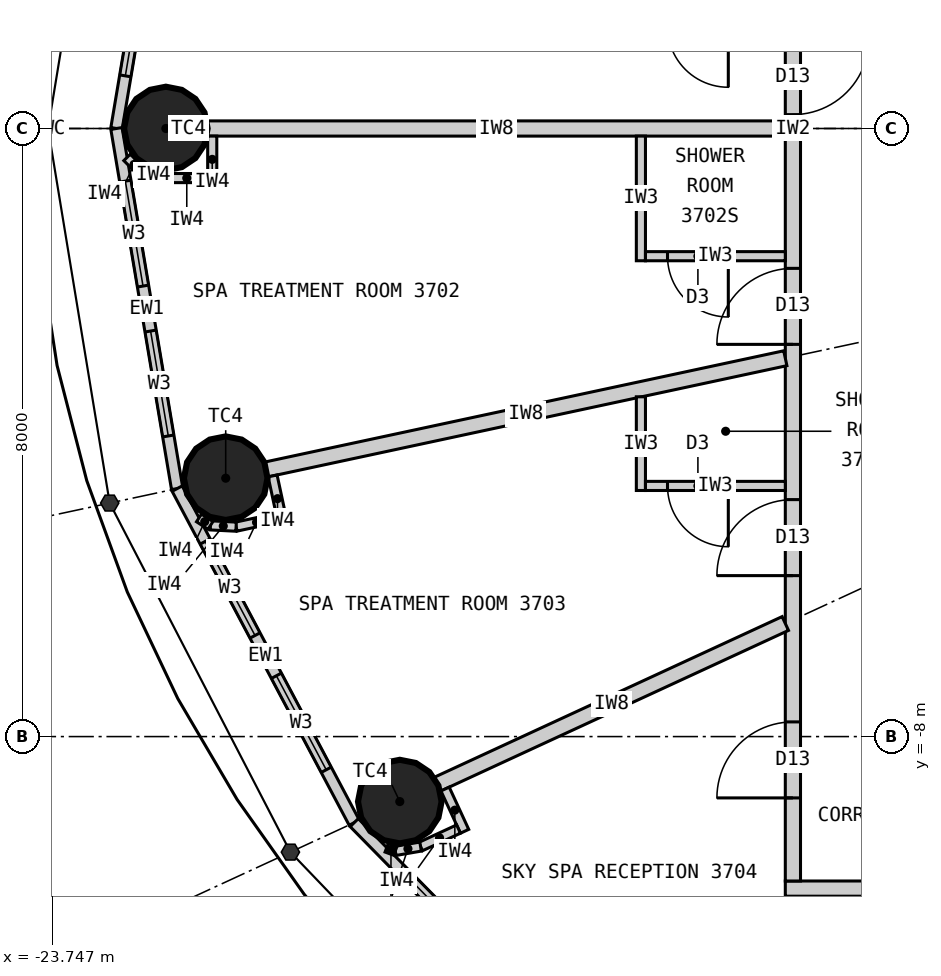
"""IFC4 building model, lengths in metres.
Left out: names, types, materials, properties, quantities, classifications, styles, units other than length and angle.
Written with IfcOpenShell. Run it as: python <this file> out.ifc"""

import sys

from ifc_helpers import new_model, si_unit, direction, frame, frame_2d, origin, origin_2d, place, context, subcontext, project, spatial, rectangle, circle, extrude, element, fill, save


model = new_model("IFC4")
c1 = context("Model", 3, precision=1e-05, world=origin(), true_north=direction((0.0, 1.0)))
c2 = subcontext(c1, "Body", "Model", "MODEL_VIEW")
j1 = project(units=[si_unit("LENGTHUNIT", "METRE"), si_unit("PLANEANGLEUNIT", "RADIAN")], contexts=[c1])
p1 = place(None, origin())
s1 = spatial("IfcSite", under=j1, at=p1, CompositionType="ELEMENT")
p2 = place(p1, origin())
s2 = spatial("IfcBuilding", under=s1, at=p2, CompositionType="ELEMENT")
p3 = place(p2, frame((0.0, 0.0, 143.4)))
s3 = spatial("IfcBuildingStorey", under=s2, at=p3, CompositionType="ELEMENT", Elevation=143.4)
for number, where, z_axis, x_axis in (
    (1, (-22.25, 0.0, 0.0), (0.0, 0.0, 1.0), (1.0, 0.0, 0.0)),
    (2, (-21.463, -4.601, 0.0), (0.0, 0.0, 1.0), (1.0, 0.0, 0.0)),
    (3, (-19.172, -8.855, 0.0), (0.0, 0.0, 1.0), (1.0, 0.0, 0.0)),
):
    element("IfcColumn", number, at=place(p3, frame(where, z_axis=z_axis, x_axis=x_axis)), inside=s3, PredefinedType="COLUMN", context=c2, shape_type="SweptSolid", body=[
        extrude(circle(Radius=0.55, at=origin_2d()), origin(), (0.0, 0.0, 1.0), 3.3),
    ])
p4 = place(p3, frame((-22.102, 4.738, 0.0), z_axis=(0.0, 0.0, 1.0), x_axis=(-0.166162111254, -0.986098449843, 0.0)))
e4 = element("IfcWall", 4, at=p4, inside=s3, PredefinedType="ELEMENTEDWALL", context=c2, shape_type="SweptSolid", body=[
    extrude(rectangle(XDim=4.805, YDim=0.15, at=frame_2d((2.402, 0.0))), origin(), (0.0, 0.0, 1.0), 3.12),
])
p5 = place(p4, frame((0.702, 0.0, 0.9)))
e5 = element("IfcOpeningElement", 5, at=p5, cuts=e4, PredefinedType="OPENING", context=c2, shape_type="SweptSolid", body=[
    extrude(rectangle(XDim=1.4, YDim=1.9, at=frame_2d((0.7, 0.95))), frame((0.0, 0.085, 0.0), z_axis=(0.0, -1.0, 0.0), x_axis=(1.0, 0.0, 0.0)), (0.0, 0.0, 1.0), 0.17),
])
p6 = place(p4, frame((2.702, 0.0, 0.9)))
e6 = element("IfcOpeningElement", 6, at=p6, cuts=e4, PredefinedType="OPENING", context=c2, shape_type="SweptSolid", body=[
    extrude(rectangle(XDim=1.4, YDim=1.9, at=frame_2d((0.7, 0.95))), frame((0.0, 0.085, 0.0), z_axis=(0.0, -1.0, 0.0), x_axis=(1.0, 0.0, 0.0)), (0.0, 0.0, 1.0), 0.17),
])
p7 = place(p3, frame((-22.9, 0.0, 0.0), z_axis=(0.0, 0.0, 1.0), x_axis=(0.166162111254, -0.986098449843, 0.0)))
e7 = element("IfcWall", 7, at=p7, inside=s3, PredefinedType="ELEMENTEDWALL", context=c2, shape_type="SweptSolid", body=[
    extrude(rectangle(XDim=4.805, YDim=0.15, at=frame_2d((2.402, 0.0))), origin(), (0.0, 0.0, 1.0), 3.12),
])
p8 = place(p7, frame((0.702, 0.0, 0.9)))
e8 = element("IfcOpeningElement", 8, at=p8, cuts=e7, PredefinedType="OPENING", context=c2, shape_type="SweptSolid", body=[
    extrude(rectangle(XDim=1.4, YDim=1.9, at=frame_2d((0.7, 0.95))), frame((0.0, 0.085, 0.0), z_axis=(0.0, -1.0, 0.0), x_axis=(1.0, 0.0, 0.0)), (0.0, 0.0, 1.0), 0.17),
])
p9 = place(p7, frame((2.702, 0.0, 0.9)))
e9 = element("IfcOpeningElement", 9, at=p9, cuts=e7, PredefinedType="OPENING", context=c2, shape_type="SweptSolid", body=[
    extrude(rectangle(XDim=1.4, YDim=1.9, at=frame_2d((0.7, 0.95))), frame((0.0, 0.085, 0.0), z_axis=(0.0, -1.0, 0.0), x_axis=(1.0, 0.0, 0.0)), (0.0, 0.0, 1.0), 0.17),
])
p10 = place(p3, frame((-22.102, -4.738, 0.0), z_axis=(0.0, 0.0, 1.0), x_axis=(0.468428906714, -0.883501193748, 0.0)))
e10 = element("IfcWall", 10, at=p10, inside=s3, PredefinedType="ELEMENTEDWALL", context=c2, shape_type="SweptSolid", body=[
    extrude(rectangle(XDim=4.974, YDim=0.15, at=frame_2d((2.487, 0.0))), origin(), (0.0, 0.0, 1.0), 3.12),
])
p11 = place(p10, frame((0.787, 0.0, 0.9)))
e11 = element("IfcOpeningElement", 11, at=p11, cuts=e10, PredefinedType="OPENING", context=c2, shape_type="SweptSolid", body=[
    extrude(rectangle(XDim=1.4, YDim=1.9, at=frame_2d((0.7, 0.95))), frame((0.0, 0.085, 0.0), z_axis=(0.0, -1.0, 0.0), x_axis=(1.0, 0.0, 0.0)), (0.0, 0.0, 1.0), 0.17),
])
p12 = place(p10, frame((2.787, 0.0, 0.9)))
e12 = element("IfcOpeningElement", 12, at=p12, cuts=e10, PredefinedType="OPENING", context=c2, shape_type="SweptSolid", body=[
    extrude(rectangle(XDim=1.4, YDim=1.9, at=frame_2d((0.7, 0.95))), frame((0.0, 0.085, 0.0), z_axis=(0.0, -1.0, 0.0), x_axis=(1.0, 0.0, 0.0)), (0.0, 0.0, 1.0), 0.17),
])
p13 = place(p3, frame((-19.772, -9.132, 0.0), z_axis=(0.0, 0.0, 1.0), x_axis=(0.700727467776, -0.71342905457, 0.0)))
e13 = element("IfcWall", 13, at=p13, inside=s3, PredefinedType="ELEMENTEDWALL", context=c2, shape_type="SweptSolid", body=[
    extrude(rectangle(XDim=5.247, YDim=0.15, at=frame_2d((2.624, 0.0))), origin(), (0.0, 0.0, 1.0), 3.12),
])
p14 = place(p13, frame((0.924, 0.0, 0.9)))
e14 = element("IfcOpeningElement", 14, at=p14, cuts=e13, PredefinedType="OPENING", context=c2, shape_type="SweptSolid", body=[
    extrude(rectangle(XDim=1.4, YDim=1.9, at=frame_2d((0.7, 0.95))), frame((0.0, 0.085, 0.0), z_axis=(0.0, -1.0, 0.0), x_axis=(1.0, 0.0, 0.0)), (0.0, 0.0, 1.0), 0.17),
])
p15 = place(p13, frame((2.924, 0.0, 0.9)))
e15 = element("IfcOpeningElement", 15, at=p15, cuts=e13, PredefinedType="OPENING", context=c2, shape_type="SweptSolid", body=[
    extrude(rectangle(XDim=1.4, YDim=1.9, at=frame_2d((0.7, 0.95))), frame((0.0, 0.085, 0.0), z_axis=(0.0, -1.0, 0.0), x_axis=(1.0, 0.0, 0.0)), (0.0, 0.0, 1.0), 0.17),
])
p16 = place(p3, frame((14.1, -10.0, 0.0), z_axis=(0.0, 0.0, 1.0), x_axis=(-1.0, 0.0, 0.0)))
e16 = element("IfcWall", 16, at=p16, inside=s3, PredefinedType="PARTITIONING", context=c2, shape_type="SweptSolid", body=[
    extrude(rectangle(XDim=28.2, YDim=0.2, at=frame_2d((14.1, 0.0))), origin(), (0.0, 0.0, 1.0), 3.12),
])
p17 = place(p16, frame((23.045, 0.0, 0.0)))
e17 = element("IfcOpeningElement", 17, at=p17, cuts=e16, PredefinedType="OPENING", context=c2, shape_type="SweptSolid", body=[
    extrude(rectangle(XDim=1.0, YDim=2.2, at=frame_2d((0.5, 1.1))), frame((0.0, 0.11, 0.0), z_axis=(0.0, -1.0, 0.0), x_axis=(1.0, 0.0, 0.0)), (0.0, 0.0, 1.0), 0.22),
])
p18 = place(p16, frame((18.529, 0.0, 0.0)))
e18 = element("IfcOpeningElement", 18, at=p18, cuts=e16, PredefinedType="OPENING", context=c2, shape_type="SweptSolid", body=[
    extrude(rectangle(XDim=1.0, YDim=2.2, at=frame_2d((0.5, 1.1))), frame((0.0, 0.11, 0.0), z_axis=(0.0, -1.0, 0.0), x_axis=(1.0, 0.0, 0.0)), (0.0, 0.0, 1.0), 0.22),
])
p19 = place(p16, frame((13.923, 0.0, 0.0)))
e19 = element("IfcOpeningElement", 19, at=p19, cuts=e16, PredefinedType="OPENING", context=c2, shape_type="SweptSolid", body=[
    extrude(rectangle(XDim=1.0, YDim=2.2, at=frame_2d((0.5, 1.1))), frame((0.0, 0.11, 0.0), z_axis=(0.0, -1.0, 0.0), x_axis=(1.0, 0.0, 0.0)), (0.0, 0.0, 1.0), 0.22),
])
p20 = place(p16, frame((9.35, 0.0, 0.0)))
e20 = element("IfcOpeningElement", 20, at=p20, cuts=e16, PredefinedType="OPENING", context=c2, shape_type="SweptSolid", body=[
    extrude(rectangle(XDim=1.6, YDim=2.4, at=frame_2d((0.8, 1.2))), frame((0.0, 0.11, 0.0), z_axis=(0.0, -1.0, 0.0), x_axis=(1.0, 0.0, 0.0)), (0.0, 0.0, 1.0), 0.22),
])
p21 = place(p3, frame((-14.0, 9.9, 0.0), z_axis=(0.0, 0.0, 1.0), x_axis=(0.0, -1.0, 0.0)))
e21 = element("IfcWall", 21, at=p21, inside=s3, PredefinedType="PARTITIONING", context=c2, shape_type="SweptSolid", body=[
    extrude(rectangle(XDim=19.8, YDim=0.2, at=frame_2d((9.9, 0.0))), origin(), (0.0, 0.0, 1.0), 3.12),
])
p22 = place(p21, frame((8.718, 0.0, 0.0)))
e22 = element("IfcOpeningElement", 22, at=p22, cuts=e21, PredefinedType="OPENING", context=c2, shape_type="SweptSolid", body=[
    extrude(rectangle(XDim=1.0, YDim=2.2, at=frame_2d((0.5, 1.1))), frame((0.0, 0.11, 0.0), z_axis=(0.0, -1.0, 0.0), x_axis=(1.0, 0.0, 0.0)), (0.0, 0.0, 1.0), 0.22),
])
p23 = place(p21, frame((11.74, 0.0, 0.0)))
e23 = element("IfcOpeningElement", 23, at=p23, cuts=e21, PredefinedType="OPENING", context=c2, shape_type="SweptSolid", body=[
    extrude(rectangle(XDim=1.0, YDim=2.2, at=frame_2d((0.5, 1.1))), frame((0.0, 0.11, 0.0), z_axis=(0.0, -1.0, 0.0), x_axis=(1.0, 0.0, 0.0)), (0.0, 0.0, 1.0), 0.22),
])
p24 = place(p21, frame((14.782, 0.0, 0.0)))
e24 = element("IfcOpeningElement", 24, at=p24, cuts=e21, PredefinedType="OPENING", context=c2, shape_type="SweptSolid", body=[
    extrude(rectangle(XDim=1.0, YDim=2.2, at=frame_2d((0.5, 1.1))), frame((0.0, 0.11, 0.0), z_axis=(0.0, -1.0, 0.0), x_axis=(1.0, 0.0, 0.0)), (0.0, 0.0, 1.0), 0.22),
])
p25 = place(p21, frame((17.707, 0.0, 0.0)))
e25 = element("IfcOpeningElement", 25, at=p25, cuts=e21, PredefinedType="OPENING", context=c2, shape_type="SweptSolid", body=[
    extrude(rectangle(XDim=1.0, YDim=2.2, at=frame_2d((0.5, 1.1))), frame((0.0, 0.11, 0.0), z_axis=(0.0, -1.0, 0.0), x_axis=(1.0, 0.0, 0.0)), (0.0, 0.0, 1.0), 0.22),
])
p26 = place(p21, frame((3.824, 0.0, 0.0)))
e26 = element("IfcOpeningElement", 26, at=p26, cuts=e21, PredefinedType="OPENING", context=c2, shape_type="SweptSolid", body=[
    extrude(rectangle(XDim=1.0, YDim=2.2, at=frame_2d((0.5, 1.1))), frame((0.0, 0.11, 0.0), z_axis=(0.0, -1.0, 0.0), x_axis=(1.0, 0.0, 0.0)), (0.0, 0.0, 1.0), 0.22),
])
p27 = place(p3, frame((-14.1, 0.0, 0.0), z_axis=(0.0, 0.0, 1.0), x_axis=(-1.0, 0.0, 0.0)))
e27 = element("IfcWall", 27, at=p27, inside=s3, PredefinedType="PARTITIONING", context=c2, shape_type="SweptSolid", body=[
    extrude(rectangle(XDim=7.6, YDim=0.2, at=frame_2d((3.8, 0.0))), origin(), (0.0, 0.0, 1.0), 2.27),
])
p28 = place(p3, frame((-14.1, -3.022, 0.0), z_axis=(0.0, 0.0, 1.0), x_axis=(-0.977790639684, -0.209584028367, 0.0)))
e28 = element("IfcWall", 28, at=p28, inside=s3, PredefinedType="PARTITIONING", context=c2, shape_type="SweptSolid", body=[
    extrude(rectangle(XDim=6.98, YDim=0.2, at=frame_2d((3.49, 0.0))), origin(), (0.0, 0.0, 1.0), 2.27),
])
p29 = place(p3, frame((-14.1, -6.512, 0.0), z_axis=(0.0, 0.0, 1.0), x_axis=(-0.907823150669, -0.419353224751, 0.0)))
e29 = element("IfcWall", 29, at=p29, inside=s3, PredefinedType="PARTITIONING", context=c2, shape_type="SweptSolid", body=[
    extrude(rectangle(XDim=5.037, YDim=0.2, at=frame_2d((2.519, 0.0))), origin(), (0.0, 0.0, 1.0), 2.22),
])
p30 = place(p3, frame((-12.625, -10.1, 0.0), z_axis=(0.0, 0.0, 1.0), x_axis=(-0.780876185034, -0.624685827954, 0.0)))
e30 = element("IfcWall", 30, at=p30, inside=s3, PredefinedType="PARTITIONING", context=c2, shape_type="SweptSolid", body=[
    extrude(rectangle(XDim=3.229, YDim=0.2, at=frame_2d((1.615, 0.0))), origin(), (0.0, 0.0, 1.0), 2.27),
])
p31 = place(p3, frame((-16.0, -0.1, 0.0), z_axis=(0.0, 0.0, 1.0), x_axis=(0.0, -1.0, 0.0)))
e31 = element("IfcWall", 31, at=p31, inside=s3, PredefinedType="PARTITIONING", context=c2, shape_type="SweptSolid", body=[
    extrude(rectangle(XDim=1.64, YDim=0.12, at=frame_2d((0.82, 0.0))), origin(), (0.0, 0.0, 1.0), 3.12),
])
p32 = place(p3, frame((-14.1, -1.68, 0.0), z_axis=(0.0, 0.0, 1.0), x_axis=(-1.0, 0.0, 0.0)))
e32 = element("IfcWall", 32, at=p32, inside=s3, PredefinedType="PARTITIONING", context=c2, shape_type="SweptSolid", body=[
    extrude(rectangle(XDim=1.84, YDim=0.12, at=frame_2d((0.92, 0.0))), origin(), (0.0, 0.0, 1.0), 3.12),
])
p33 = place(p32, frame((0.75, 0.0, 0.0)))
e33 = element("IfcOpeningElement", 33, at=p33, cuts=e32, PredefinedType="OPENING", context=c2, shape_type="SweptSolid", body=[
    extrude(rectangle(XDim=0.8, YDim=2.1, at=frame_2d((0.4, 1.05))), frame((0.0, 0.07, 0.0), z_axis=(0.0, -1.0, 0.0), x_axis=(1.0, 0.0, 0.0)), (0.0, 0.0, 1.0), 0.14),
])
p34 = place(p3, frame((-16.0, -3.53, 0.0), z_axis=(0.0, 0.0, 1.0), x_axis=(0.0, -1.0, 0.0)))
e34 = element("IfcWall", 34, at=p34, inside=s3, PredefinedType="PARTITIONING", context=c2, shape_type="SweptSolid", body=[
    extrude(rectangle(XDim=1.233, YDim=0.12, at=frame_2d((0.616, 0.0))), origin(), (0.0, 0.0, 1.0), 3.12),
])
p35 = place(p3, frame((-14.1, -4.702, 0.0), z_axis=(0.0, 0.0, 1.0), x_axis=(-1.0, 0.0, 0.0)))
e35 = element("IfcWall", 35, at=p35, inside=s3, PredefinedType="PARTITIONING", context=c2, shape_type="SweptSolid", body=[
    extrude(rectangle(XDim=1.84, YDim=0.12, at=frame_2d((0.92, 0.0))), origin(), (0.0, 0.0, 1.0), 3.12),
])
p36 = place(p35, frame((0.75, 0.0, 0.0)))
e36 = element("IfcOpeningElement", 36, at=p36, cuts=e35, PredefinedType="OPENING", context=c2, shape_type="SweptSolid", body=[
    extrude(rectangle(XDim=0.8, YDim=2.1, at=frame_2d((0.4, 1.05))), frame((0.0, 0.07, 0.0), z_axis=(0.0, -1.0, 0.0), x_axis=(1.0, 0.0, 0.0)), (0.0, 0.0, 1.0), 0.14),
])
p37 = place(p3, frame((-21.64, -0.1, 0.0), z_axis=(0.0, 0.0, 1.0), x_axis=(0.0, -1.0, 0.0)))
e37 = element("IfcWall", 37, at=p37, inside=s3, PredefinedType="PARTITIONING", context=c2, shape_type="SweptSolid", body=[
    extrude(rectangle(XDim=0.612, YDim=0.12, at=frame_2d((0.306, 0.0))), origin(), (0.0, 0.0, 1.0), 3.12),
])
p38 = place(p3, frame((-21.7, -0.652, 0.0), z_axis=(0.0, 0.0, 1.0), x_axis=(-1.0, 0.0, 0.0)))
e38 = element("IfcWall", 38, at=p38, inside=s3, PredefinedType="PARTITIONING", context=c2, shape_type="SweptSolid", body=[
    extrude(rectangle(XDim=0.55, YDim=0.12, at=frame_2d((0.275, 0.0))), origin(), (0.0, 0.0, 1.0), 3.12),
])
p39 = place(p3, frame((-22.25, -0.652, 0.0), z_axis=(0.0, 0.0, 1.0), x_axis=(-0.965922233104, 0.258832454679, 0.0)))
e39 = element("IfcWall", 39, at=p39, inside=s3, PredefinedType="PARTITIONING", context=c2, shape_type="SweptSolid", body=[
    extrude(rectangle(XDim=0.338, YDim=0.12, at=frame_2d((0.169, 0.0))), origin(), (0.0, 0.0, 1.0), 3.12),
])
p40 = place(p3, frame((-22.576, -0.565, 0.0), z_axis=(0.0, 0.0, 1.0), x_axis=(-0.706639272724, 0.707573980757, 0.0)))
e40 = element("IfcWall", 40, at=p40, inside=s3, PredefinedType="PARTITIONING", context=c2, shape_type="SweptSolid", body=[
    extrude(rectangle(XDim=0.261, YDim=0.12, at=frame_2d((0.131, 0.0))), origin(), (0.0, 0.0, 1.0), 3.12),
])
p41 = place(p3, frame((-20.845, -4.571, 0.0), z_axis=(0.0, 0.0, 1.0), x_axis=(0.209365678446, -0.977837416286, 0.0)))
e41 = element("IfcWall", 41, at=p41, inside=s3, PredefinedType="PARTITIONING", context=c2, shape_type="SweptSolid", body=[
    extrude(rectangle(XDim=0.612, YDim=0.12, at=frame_2d((0.306, 0.0))), origin(), (0.0, 0.0, 1.0), 3.12),
])
p42 = place(p3, frame((-20.788, -5.123, 0.0), z_axis=(0.0, 0.0, 1.0), x_axis=(-0.977789415726, -0.209589738521, 0.0)))
e42 = element("IfcWall", 42, at=p42, inside=s3, PredefinedType="PARTITIONING", context=c2, shape_type="SweptSolid", body=[
    extrude(rectangle(XDim=0.55, YDim=0.12, at=frame_2d((0.275, 0.0))), origin(), (0.0, 0.0, 1.0), 3.12),
])
p43 = place(p3, frame((-21.326, -5.239, 0.0), z_axis=(0.0, 0.0, 1.0), x_axis=(-0.998719689441, 0.050586380797, 0.0)))
e43 = element("IfcWall", 43, at=p43, inside=s3, PredefinedType="PARTITIONING", context=c2, shape_type="SweptSolid", body=[
    extrude(rectangle(XDim=0.338, YDim=0.12, at=frame_2d((0.169, 0.0))), origin(), (0.0, 0.0, 1.0), 3.12),
])
p44 = place(p3, frame((-21.663, -5.221, 0.0), z_axis=(0.0, 0.0, 1.0), x_axis=(-0.839279022252, 0.543700949795, 0.0)))
e44 = element("IfcWall", 44, at=p44, inside=s3, PredefinedType="PARTITIONING", context=c2, shape_type="SweptSolid", body=[
    extrude(rectangle(XDim=0.18, YDim=0.12, at=frame_2d((0.09, 0.0))), origin(), (0.0, 0.0, 1.0), 3.12),
])
p45 = place(p3, frame((-18.576, -8.69, 0.0), z_axis=(0.0, 0.0, 1.0), x_axis=(0.419083463716, -0.907947713494, 0.0)))
e45 = element("IfcWall", 45, at=p45, inside=s3, PredefinedType="PARTITIONING", context=c2, shape_type="SweptSolid", body=[
    extrude(rectangle(XDim=0.612, YDim=0.12, at=frame_2d((0.306, 0.0))), origin(), (0.0, 0.0, 1.0), 3.12),
])
p46 = place(p3, frame((-18.399, -9.217, 0.0), z_axis=(0.0, 0.0, 1.0), x_axis=(-0.907933393845, -0.419114485961, 0.0)))
e46 = element("IfcWall", 46, at=p46, inside=s3, PredefinedType="PARTITIONING", context=c2, shape_type="SweptSolid", body=[
    extrude(rectangle(XDim=0.55, YDim=0.12, at=frame_2d((0.275, 0.0))), origin(), (0.0, 0.0, 1.0), 3.12),
])
p47 = place(p3, frame((-18.899, -9.447, 0.0), z_axis=(0.0, 0.0, 1.0), x_axis=(-0.985338822624, -0.170608923066, 0.0)))
e47 = element("IfcWall", 47, at=p47, inside=s3, PredefinedType="PARTITIONING", context=c2, shape_type="SweptSolid", body=[
    extrude(rectangle(XDim=0.338, YDim=0.12, at=frame_2d((0.169, 0.0))), origin(), (0.0, 0.0, 1.0), 3.12),
])
p48 = place(p3, frame((-19.231, -9.505, 0.0), z_axis=(0.0, 0.0, 1.0), x_axis=(-0.938377418573, 0.345612239817, 0.0)))
e48 = element("IfcWall", 48, at=p48, inside=s3, PredefinedType="PARTITIONING", context=c2, shape_type="SweptSolid", body=[
    extrude(rectangle(XDim=0.122, YDim=0.12, at=frame_2d((0.061, 0.0))), origin(), (0.0, 0.0, 1.0), 3.12),
])
p49 = place(p6, origin())
e49 = element("IfcWindow", 49, at=p49, inside=s3, PartitioningType="SINGLE_PANEL", PredefinedType="WINDOW", context=c2, shape_type="SweptSolid", body=[
    extrude(rectangle(XDim=1.4, YDim=1.9, at=frame_2d((0.7, 0.95))), frame((0.0, 0.03, 0.0), z_axis=(0.0, -1.0, 0.0), x_axis=(1.0, 0.0, 0.0)), (0.0, 0.0, 1.0), 0.06),
])
fill(e6, e49)
p50 = place(p8, origin())
e50 = element("IfcWindow", 50, at=p50, inside=s3, PartitioningType="SINGLE_PANEL", PredefinedType="WINDOW", context=c2, shape_type="SweptSolid", body=[
    extrude(rectangle(XDim=1.4, YDim=1.9, at=frame_2d((0.7, 0.95))), frame((0.0, 0.03, 0.0), z_axis=(0.0, -1.0, 0.0), x_axis=(1.0, 0.0, 0.0)), (0.0, 0.0, 1.0), 0.06),
])
fill(e8, e50)
p51 = place(p9, origin())
e51 = element("IfcWindow", 51, at=p51, inside=s3, PartitioningType="SINGLE_PANEL", PredefinedType="WINDOW", context=c2, shape_type="SweptSolid", body=[
    extrude(rectangle(XDim=1.4, YDim=1.9, at=frame_2d((0.7, 0.95))), frame((0.0, 0.03, 0.0), z_axis=(0.0, -1.0, 0.0), x_axis=(1.0, 0.0, 0.0)), (0.0, 0.0, 1.0), 0.06),
])
fill(e9, e51)
p52 = place(p11, origin())
e52 = element("IfcWindow", 52, at=p52, inside=s3, PartitioningType="SINGLE_PANEL", PredefinedType="WINDOW", context=c2, shape_type="SweptSolid", body=[
    extrude(rectangle(XDim=1.4, YDim=1.9, at=frame_2d((0.7, 0.95))), frame((0.0, 0.03, 0.0), z_axis=(0.0, -1.0, 0.0), x_axis=(1.0, 0.0, 0.0)), (0.0, 0.0, 1.0), 0.06),
])
fill(e11, e52)
p53 = place(p12, origin())
e53 = element("IfcWindow", 53, at=p53, inside=s3, PartitioningType="SINGLE_PANEL", PredefinedType="WINDOW", context=c2, shape_type="SweptSolid", body=[
    extrude(rectangle(XDim=1.4, YDim=1.9, at=frame_2d((0.7, 0.95))), frame((0.0, 0.03, 0.0), z_axis=(0.0, -1.0, 0.0), x_axis=(1.0, 0.0, 0.0)), (0.0, 0.0, 1.0), 0.06),
])
fill(e12, e53)
p54 = place(p14, origin())
e54 = element("IfcWindow", 54, at=p54, inside=s3, PartitioningType="SINGLE_PANEL", PredefinedType="WINDOW", context=c2, shape_type="SweptSolid", body=[
    extrude(rectangle(XDim=1.4, YDim=1.9, at=frame_2d((0.7, 0.95))), frame((0.0, 0.03, 0.0), z_axis=(0.0, -1.0, 0.0), x_axis=(1.0, 0.0, 0.0)), (0.0, 0.0, 1.0), 0.06),
])
fill(e14, e54)
p55 = place(p22, origin())
e55 = element("IfcDoor", 55, at=p55, inside=s3, OperationType="SINGLE_SWING_LEFT", PredefinedType="DOOR", context=c2, shape_type="SweptSolid", body=[
    extrude(rectangle(XDim=1.0, YDim=2.2, at=frame_2d((0.5, 1.1))), frame((0.0, 0.025, 0.0), z_axis=(0.0, -1.0, 0.0), x_axis=(1.0, 0.0, 0.0)), (0.0, 0.0, 1.0), 0.05),
])
fill(e22, e55)
p56 = place(p33, origin())
e56 = element("IfcDoor", 56, at=p56, inside=s3, OperationType="SINGLE_SWING_LEFT", PredefinedType="DOOR", context=c2, shape_type="SweptSolid", body=[
    extrude(rectangle(XDim=0.8, YDim=2.1, at=frame_2d((0.4, 1.05))), frame((0.0, 0.025, 0.0), z_axis=(0.0, -1.0, 0.0), x_axis=(1.0, 0.0, 0.0)), (0.0, 0.0, 1.0), 0.05),
])
fill(e33, e56)
p57 = place(p23, origin())
e57 = element("IfcDoor", 57, at=p57, inside=s3, OperationType="SINGLE_SWING_RIGHT", PredefinedType="DOOR", context=c2, shape_type="SweptSolid", body=[
    extrude(rectangle(XDim=1.0, YDim=2.2, at=frame_2d((0.5, 1.1))), frame((0.0, 0.025, 0.0), z_axis=(0.0, -1.0, 0.0), x_axis=(1.0, 0.0, 0.0)), (0.0, 0.0, 1.0), 0.05),
])
fill(e23, e57)
p58 = place(p36, origin())
e58 = element("IfcDoor", 58, at=p58, inside=s3, OperationType="SINGLE_SWING_LEFT", PredefinedType="DOOR", context=c2, shape_type="SweptSolid", body=[
    extrude(rectangle(XDim=0.8, YDim=2.1, at=frame_2d((0.4, 1.05))), frame((0.0, 0.025, 0.0), z_axis=(0.0, -1.0, 0.0), x_axis=(1.0, 0.0, 0.0)), (0.0, 0.0, 1.0), 0.05),
])
fill(e36, e58)
p59 = place(p24, origin())
e59 = element("IfcDoor", 59, at=p59, inside=s3, OperationType="SINGLE_SWING_RIGHT", PredefinedType="DOOR", context=c2, shape_type="SweptSolid", body=[
    extrude(rectangle(XDim=1.0, YDim=2.2, at=frame_2d((0.5, 1.1))), frame((0.0, 0.025, 0.0), z_axis=(0.0, -1.0, 0.0), x_axis=(1.0, 0.0, 0.0)), (0.0, 0.0, 1.0), 0.05),
])
fill(e24, e59)
p60 = place(p25, origin())
e60 = element("IfcDoor", 60, at=p60, inside=s3, OperationType="SINGLE_SWING_RIGHT", PredefinedType="DOOR", context=c2, shape_type="SweptSolid", body=[
    extrude(rectangle(XDim=1.0, YDim=2.2, at=frame_2d((0.5, 1.1))), frame((0.0, 0.025, 0.0), z_axis=(0.0, -1.0, 0.0), x_axis=(1.0, 0.0, 0.0)), (0.0, 0.0, 1.0), 0.05),
])
fill(e25, e60)
save(model, sys.argv[1])
